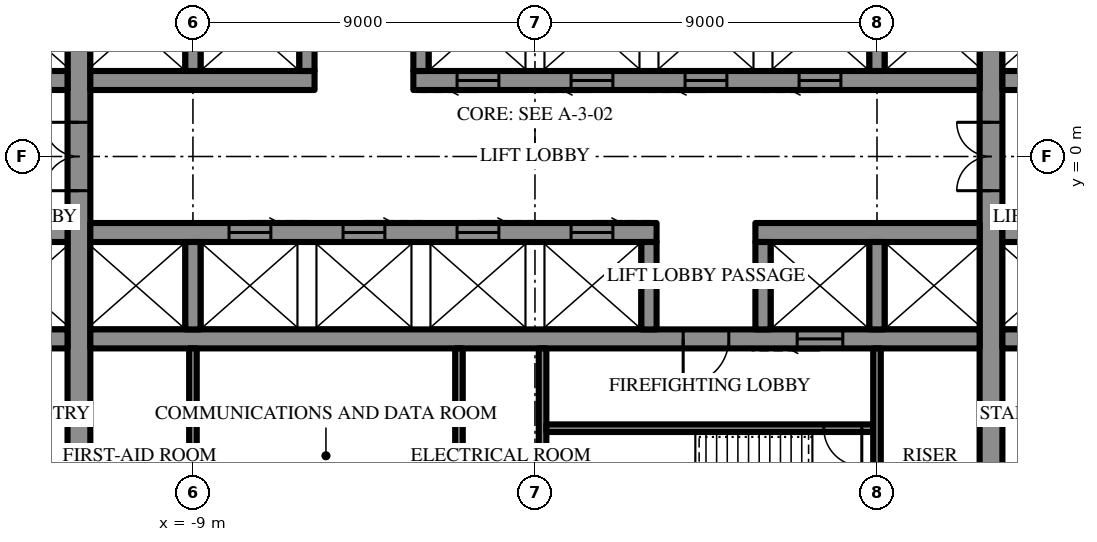
"""IFC4 building model, lengths in metres.
Left out: names, types, materials, properties, quantities, classifications, styles, units other than length and angle.
Written with IfcOpenShell. Run it as: python <this file> out.ifc"""

import sys

from ifc_helpers import new_model, si_unit, direction, frame, frame_2d, origin, place, context, subcontext, project, spatial, rectangle, extrude, element, fill, save


model = new_model("IFC4")
c1 = context("Model", 3, precision=1e-05, world=origin(), true_north=direction((0.0, 1.0)))
c2 = subcontext(c1, "Body", "Model", "MODEL_VIEW")
j1 = project(units=[si_unit("LENGTHUNIT", "METRE"), si_unit("PLANEANGLEUNIT", "RADIAN")], contexts=[c1])
p1 = place(None, origin())
s1 = spatial("IfcSite", under=j1, at=p1, CompositionType="ELEMENT")
p2 = place(p1, origin())
s2 = spatial("IfcBuilding", under=s1, at=p2, CompositionType="ELEMENT")
p3 = place(p2, frame((0.0, 0.0, 174.1)))
s3 = spatial("IfcBuildingStorey", under=s2, at=p3, CompositionType="ELEMENT", Elevation=174.1)
p4 = place(p3, frame((12.0, -10.7, 0.0), z_axis=(0.0, 0.0, 1.0), x_axis=(0.0, 1.0, 0.0)))
e1 = element("IfcWall", 1, at=p4, inside=s3, PredefinedType="SHEAR", context=c2, shape_type="SweptSolid", body=[
    extrude(rectangle(XDim=21.4, YDim=0.6, at=frame_2d((10.7, 0.0))), origin(), (0.0, 0.0, 1.0), 4.2),
])
p5 = place(p4, frame((9.8, 0.0, 0.0)))
e2 = element("IfcOpeningElement", 2, at=p5, cuts=e1, PredefinedType="OPENING", context=c2, shape_type="SweptSolid", body=[
    extrude(rectangle(XDim=1.8, YDim=2.4, at=frame_2d((0.9, 1.2))), frame((0.0, 0.31, 0.0), z_axis=(0.0, -1.0, 0.0), x_axis=(1.0, 0.0, 0.0)), (0.0, 0.0, 1.0), 0.62),
])
p6 = place(p3, frame((-12.0, -10.7, 0.0), z_axis=(0.0, 0.0, 1.0), x_axis=(0.0, 1.0, 0.0)))
e3 = element("IfcWall", 3, at=p6, inside=s3, PredefinedType="SHEAR", context=c2, shape_type="SweptSolid", body=[
    extrude(rectangle(XDim=21.4, YDim=0.6, at=frame_2d((10.7, 0.0))), origin(), (0.0, 0.0, 1.0), 4.2),
])
p7 = place(p6, frame((9.8, 0.0, 0.0)))
e4 = element("IfcOpeningElement", 4, at=p7, cuts=e3, PredefinedType="OPENING", context=c2, shape_type="SweptSolid", body=[
    extrude(rectangle(XDim=1.8, YDim=2.4, at=frame_2d((0.9, 1.2))), frame((0.0, 0.31, 0.0), z_axis=(0.0, -1.0, 0.0), x_axis=(1.0, 0.0, 0.0)), (0.0, 0.0, 1.0), 0.62),
])
p8 = place(p3, frame((-14.7, 2.0, 0.0), z_axis=(0.0, 0.0, 1.0), x_axis=(1.0, 0.0, 0.0)))
e5 = element("IfcWall", 5, at=p8, inside=s3, PredefinedType="SHEAR", context=c2, shape_type="SweptSolid", body=[
    extrude(rectangle(XDim=2.4, YDim=0.5, at=frame_2d((1.2, 0.0))), origin(), (0.0, 0.0, 1.0), 4.2),
])
p9 = place(p3, frame((-11.7, 2.0, 0.0), z_axis=(0.0, 0.0, 1.0), x_axis=(1.0, 0.0, 0.0)))
e6 = element("IfcWall", 6, at=p9, inside=s3, PredefinedType="SHEAR", context=c2, shape_type="SweptSolid", body=[
    extrude(rectangle(XDim=5.9, YDim=0.5, at=frame_2d((2.95, 0.0))), origin(), (0.0, 0.0, 1.0), 4.2),
])
p10 = place(p3, frame((-3.2, 2.0, 0.0), z_axis=(0.0, 0.0, 1.0), x_axis=(1.0, 0.0, 0.0)))
e7 = element("IfcWall", 7, at=p10, inside=s3, PredefinedType="SHEAR", context=c2, shape_type="SweptSolid", body=[
    extrude(rectangle(XDim=14.9, YDim=0.5, at=frame_2d((7.45, 0.0))), origin(), (0.0, 0.0, 1.0), 4.2),
])
p11 = place(p10, frame((1.15, 0.0, 0.0)))
e8 = element("IfcOpeningElement", 8, at=p11, cuts=e7, PredefinedType="OPENING", context=c2, shape_type="SweptSolid", body=[
    extrude(rectangle(XDim=1.1, YDim=2.2, at=frame_2d((0.55, 1.1))), frame((0.0, 0.26, 0.0), z_axis=(0.0, -1.0, 0.0), x_axis=(1.0, 0.0, 0.0)), (0.0, 0.0, 1.0), 0.52),
])
p12 = place(p10, frame((4.15, 0.0, 0.0)))
e9 = element("IfcOpeningElement", 9, at=p12, cuts=e7, PredefinedType="OPENING", context=c2, shape_type="SweptSolid", body=[
    extrude(rectangle(XDim=1.1, YDim=2.2, at=frame_2d((0.55, 1.1))), frame((0.0, 0.26, 0.0), z_axis=(0.0, -1.0, 0.0), x_axis=(1.0, 0.0, 0.0)), (0.0, 0.0, 1.0), 0.52),
])
p13 = place(p10, frame((7.15, 0.0, 0.0)))
e10 = element("IfcOpeningElement", 10, at=p13, cuts=e7, PredefinedType="OPENING", context=c2, shape_type="SweptSolid", body=[
    extrude(rectangle(XDim=1.1, YDim=2.2, at=frame_2d((0.55, 1.1))), frame((0.0, 0.26, 0.0), z_axis=(0.0, -1.0, 0.0), x_axis=(1.0, 0.0, 0.0)), (0.0, 0.0, 1.0), 0.52),
])
p14 = place(p10, frame((10.15, 0.0, 0.0)))
e11 = element("IfcOpeningElement", 11, at=p14, cuts=e7, PredefinedType="OPENING", context=c2, shape_type="SweptSolid", body=[
    extrude(rectangle(XDim=1.1, YDim=2.2, at=frame_2d((0.55, 1.1))), frame((0.0, 0.26, 0.0), z_axis=(0.0, -1.0, 0.0), x_axis=(1.0, 0.0, 0.0)), (0.0, 0.0, 1.0), 0.52),
])
p15 = place(p3, frame((12.3, 2.0, 0.0), z_axis=(0.0, 0.0, 1.0), x_axis=(1.0, 0.0, 0.0)))
e12 = element("IfcWall", 12, at=p15, inside=s3, PredefinedType="SHEAR", context=c2, shape_type="SweptSolid", body=[
    extrude(rectangle(XDim=2.4, YDim=0.5, at=frame_2d((1.2, 0.0))), origin(), (0.0, 0.0, 1.0), 4.2),
])
for number, where, z_axis, x_axis in (
    (13, (-9.0, 2.25, 0.0), (0.0, 0.0, 1.0), (0.0, 1.0, 0.0)),
    (14, (-6.0, 2.25, 0.0), (0.0, 0.0, 1.0), (0.0, 1.0, 0.0)),
    (15, (-3.0, 2.25, 0.0), (0.0, 0.0, 1.0), (0.0, 1.0, 0.0)),
    (16, (9.0, 2.25, 0.0), (0.0, 0.0, 1.0), (0.0, 1.0, 0.0)),
):
    element("IfcWall", number, at=place(p3, frame(where, z_axis=z_axis, x_axis=x_axis)), inside=s3, PredefinedType="SHEAR", context=c2, shape_type="SweptSolid", body=[
        extrude(rectangle(XDim=2.3, YDim=0.4, at=frame_2d((1.15, 0.0))), origin(), (0.0, 0.0, 1.0), 4.2),
    ])
p16 = place(p3, frame((14.7, -2.0, 0.0), z_axis=(0.0, 0.0, 1.0), x_axis=(-1.0, 0.0, 0.0)))
e17 = element("IfcWall", 17, at=p16, inside=s3, PredefinedType="SHEAR", context=c2, shape_type="SweptSolid", body=[
    extrude(rectangle(XDim=2.4, YDim=0.5, at=frame_2d((1.2, 0.0))), origin(), (0.0, 0.0, 1.0), 4.2),
])
p17 = place(p3, frame((11.7, -2.0, 0.0), z_axis=(0.0, 0.0, 1.0), x_axis=(-1.0, 0.0, 0.0)))
e18 = element("IfcWall", 18, at=p17, inside=s3, PredefinedType="SHEAR", context=c2, shape_type="SweptSolid", body=[
    extrude(rectangle(XDim=5.9, YDim=0.5, at=frame_2d((2.95, 0.0))), origin(), (0.0, 0.0, 1.0), 4.2),
])
p18 = place(p3, frame((3.2, -2.0, 0.0), z_axis=(0.0, 0.0, 1.0), x_axis=(-1.0, 0.0, 0.0)))
e19 = element("IfcWall", 19, at=p18, inside=s3, PredefinedType="SHEAR", context=c2, shape_type="SweptSolid", body=[
    extrude(rectangle(XDim=14.9, YDim=0.5, at=frame_2d((7.45, 0.0))), origin(), (0.0, 0.0, 1.0), 4.2),
])
p19 = place(p18, frame((1.15, 0.0, 0.0)))
e20 = element("IfcOpeningElement", 20, at=p19, cuts=e19, PredefinedType="OPENING", context=c2, shape_type="SweptSolid", body=[
    extrude(rectangle(XDim=1.1, YDim=2.2, at=frame_2d((0.55, 1.1))), frame((0.0, 0.26, 0.0), z_axis=(0.0, -1.0, 0.0), x_axis=(1.0, 0.0, 0.0)), (0.0, 0.0, 1.0), 0.52),
])
p20 = place(p18, frame((4.15, 0.0, 0.0)))
e21 = element("IfcOpeningElement", 21, at=p20, cuts=e19, PredefinedType="OPENING", context=c2, shape_type="SweptSolid", body=[
    extrude(rectangle(XDim=1.1, YDim=2.2, at=frame_2d((0.55, 1.1))), frame((0.0, 0.26, 0.0), z_axis=(0.0, -1.0, 0.0), x_axis=(1.0, 0.0, 0.0)), (0.0, 0.0, 1.0), 0.52),
])
p21 = place(p18, frame((7.15, 0.0, 0.0)))
e22 = element("IfcOpeningElement", 22, at=p21, cuts=e19, PredefinedType="OPENING", context=c2, shape_type="SweptSolid", body=[
    extrude(rectangle(XDim=1.1, YDim=2.2, at=frame_2d((0.55, 1.1))), frame((0.0, 0.26, 0.0), z_axis=(0.0, -1.0, 0.0), x_axis=(1.0, 0.0, 0.0)), (0.0, 0.0, 1.0), 0.52),
])
p22 = place(p18, frame((10.15, 0.0, 0.0)))
e23 = element("IfcOpeningElement", 23, at=p22, cuts=e19, PredefinedType="OPENING", context=c2, shape_type="SweptSolid", body=[
    extrude(rectangle(XDim=1.1, YDim=2.2, at=frame_2d((0.55, 1.1))), frame((0.0, 0.26, 0.0), z_axis=(0.0, -1.0, 0.0), x_axis=(1.0, 0.0, 0.0)), (0.0, 0.0, 1.0), 0.52),
])
for number, where, z_axis, x_axis in (
    (24, (-12.3, -2.0, 0.0), (0.0, 0.0, 1.0), (-1.0, 0.0, 0.0)),
    (25, (14.7, -4.8, 0.0), (0.0, 0.0, 1.0), (-1.0, 0.0, 0.0)),
):
    element("IfcWall", number, at=place(p3, frame(where, z_axis=z_axis, x_axis=x_axis)), inside=s3, PredefinedType="SHEAR", context=c2, shape_type="SweptSolid", body=[
        extrude(rectangle(XDim=2.4, YDim=0.5, at=frame_2d((1.2, 0.0))), origin(), (0.0, 0.0, 1.0), 4.2),
    ])
p23 = place(p3, frame((11.7, -4.8, 0.0), z_axis=(0.0, 0.0, 1.0), x_axis=(-1.0, 0.0, 0.0)))
e26 = element("IfcWall", 26, at=p23, inside=s3, PredefinedType="SHEAR", context=c2, shape_type="SweptSolid", body=[
    extrude(rectangle(XDim=23.4, YDim=0.5, at=frame_2d((11.7, 0.0))), origin(), (0.0, 0.0, 1.0), 4.2),
])
p24 = place(p23, frame((6.6, 0.0, 0.0)))
e27 = element("IfcOpeningElement", 27, at=p24, cuts=e26, PredefinedType="OPENING", context=c2, shape_type="SweptSolid", body=[
    extrude(rectangle(XDim=1.2, YDim=2.2, at=frame_2d((0.6, 1.1))), frame((0.0, 0.26, 0.0), z_axis=(0.0, -1.0, 0.0), x_axis=(1.0, 0.0, 0.0)), (0.0, 0.0, 1.0), 0.52),
])
p25 = place(p23, frame((3.6, 0.0, 0.0)))
e28 = element("IfcOpeningElement", 28, at=p25, cuts=e26, PredefinedType="OPENING", context=c2, shape_type="SweptSolid", body=[
    extrude(rectangle(XDim=1.2, YDim=2.2, at=frame_2d((0.6, 1.1))), frame((0.0, 0.26, 0.0), z_axis=(0.0, -1.0, 0.0), x_axis=(1.0, 0.0, 0.0)), (0.0, 0.0, 1.0), 0.52),
])
p26 = place(p3, frame((-12.3, -4.8, 0.0), z_axis=(0.0, 0.0, 1.0), x_axis=(-1.0, 0.0, 0.0)))
e29 = element("IfcWall", 29, at=p26, inside=s3, PredefinedType="SHEAR", context=c2, shape_type="SweptSolid", body=[
    extrude(rectangle(XDim=2.4, YDim=0.5, at=frame_2d((1.2, 0.0))), origin(), (0.0, 0.0, 1.0), 4.2),
])
for number, where, z_axis, x_axis in (
    (30, (9.0, -2.25, 0.0), (0.0, 0.0, 1.0), (0.0, -1.0, 0.0)),
    (31, (6.0, -2.25, 0.0), (0.0, 0.0, 1.0), (0.0, -1.0, 0.0)),
    (32, (3.0, -2.25, 0.0), (0.0, 0.0, 1.0), (0.0, -1.0, 0.0)),
    (33, (-9.0, -2.25, 0.0), (0.0, 0.0, 1.0), (0.0, -1.0, 0.0)),
):
    element("IfcWall", number, at=place(p3, frame(where, z_axis=z_axis, x_axis=x_axis)), inside=s3, PredefinedType="SHEAR", context=c2, shape_type="SweptSolid", body=[
        extrude(rectangle(XDim=2.3, YDim=0.4, at=frame_2d((1.15, 0.0))), origin(), (0.0, 0.0, 1.0), 4.2),
    ])
p27 = place(p3, frame((0.2, -5.05, 0.0), z_axis=(0.0, 0.0, 1.0), x_axis=(0.0, -1.0, 0.0)))
e34 = element("IfcWall", 34, at=p27, inside=s3, PredefinedType="SHEAR", context=c2, shape_type="SweptSolid", body=[
    extrude(rectangle(XDim=5.65, YDim=0.2, at=frame_2d((2.825, 0.0))), origin(), (0.0, 0.0, 1.0), 4.2),
])
p28 = place(p3, frame((8.9, -7.15, 0.0), z_axis=(0.0, 0.0, 1.0), x_axis=(-1.0, 0.0, 0.0)))
e35 = element("IfcWall", 35, at=p28, inside=s3, PredefinedType="SHEAR", context=c2, shape_type="SweptSolid", body=[
    extrude(rectangle(XDim=8.6, YDim=0.2, at=frame_2d((4.3, 0.0))), origin(), (0.0, 0.0, 1.0), 4.2),
])
p29 = place(p28, frame((0.3, 0.0, 0.0)))
e36 = element("IfcOpeningElement", 36, at=p29, cuts=e35, PredefinedType="OPENING", context=c2, shape_type="SweptSolid", body=[
    extrude(rectangle(XDim=1.0, YDim=2.2, at=frame_2d((0.5, 1.1))), frame((0.0, 0.11, 0.0), z_axis=(0.0, -1.0, 0.0), x_axis=(1.0, 0.0, 0.0)), (0.0, 0.0, 1.0), 0.22),
])
for number, where, z_axis, x_axis in (
    (37, (9.0, -5.05, 0.0), (0.0, 0.0, 1.0), (0.0, -1.0, 0.0)),
    (38, (-9.0, -5.05, 0.0), (0.0, 0.0, 1.0), (0.0, -1.0, 0.0)),
    (39, (-2.0, -5.05, 0.0), (0.0, 0.0, 1.0), (0.0, -1.0, 0.0)),
):
    element("IfcWall", number, at=place(p3, frame(where, z_axis=z_axis, x_axis=x_axis)), inside=s3, PredefinedType="PARTITIONING", context=c2, shape_type="SweptSolid", body=[
        extrude(rectangle(XDim=5.65, YDim=0.2, at=frame_2d((2.825, 0.0))), origin(), (0.0, 0.0, 1.0), 4.0),
    ])
p30 = place(p24, origin())
e40 = element("IfcDoor", 40, at=p30, inside=s3, OperationType="SINGLE_SWING_LEFT", PredefinedType="DOOR", context=c2, shape_type="SweptSolid", body=[
    extrude(rectangle(XDim=1.2, YDim=2.2, at=frame_2d((0.6, 1.1))), frame((0.0, 0.025, 0.0), z_axis=(0.0, -1.0, 0.0), x_axis=(1.0, 0.0, 0.0)), (0.0, 0.0, 1.0), 0.05),
])
fill(e27, e40)
p31 = place(p29, origin())
e41 = element("IfcDoor", 41, at=p31, inside=s3, OperationType="SINGLE_SWING_RIGHT", PredefinedType="DOOR", context=c2, shape_type="SweptSolid", body=[
    extrude(rectangle(XDim=1.0, YDim=2.2, at=frame_2d((0.5, 1.1))), frame((0.0, 0.025, 0.0), z_axis=(0.0, -1.0, 0.0), x_axis=(1.0, 0.0, 0.0)), (0.0, 0.0, 1.0), 0.05),
])
fill(e36, e41)
p32 = place(p5, origin())
e42 = element("IfcDoor", 42, at=p32, inside=s3, OperationType="DOUBLE_DOOR_SINGLE_SWING", PredefinedType="DOOR", context=c2, shape_type="SweptSolid", body=[
    extrude(rectangle(XDim=1.8, YDim=2.4, at=frame_2d((0.9, 1.2))), frame((0.0, 0.025, 0.0), z_axis=(0.0, -1.0, 0.0), x_axis=(1.0, 0.0, 0.0)), (0.0, 0.0, 1.0), 0.05),
])
fill(e2, e42)
p33 = place(p7, origin())
e43 = element("IfcDoor", 43, at=p33, inside=s3, OperationType="DOUBLE_DOOR_SINGLE_SWING", PredefinedType="DOOR", context=c2, shape_type="SweptSolid", body=[
    extrude(rectangle(XDim=1.8, YDim=2.4, at=frame_2d((0.9, 1.2))), frame((0.0, 0.025, 0.0), z_axis=(0.0, -1.0, 0.0), x_axis=(1.0, 0.0, 0.0)), (0.0, 0.0, 1.0), 0.05),
])
fill(e4, e43)
p34 = place(p11, frame((1.1, 0.0, 0.0), z_axis=(0.0, 0.0, 1.0), x_axis=(-1.0, 0.0, 0.0)))
e44 = element("IfcDoor", 44, at=p34, inside=s3, OperationType="SLIDING_TO_LEFT", PredefinedType="DOOR", context=c2, shape_type="SweptSolid", body=[
    extrude(rectangle(XDim=1.1, YDim=2.2, at=frame_2d((0.55, 1.1))), frame((0.0, 0.025, 0.0), z_axis=(0.0, -1.0, 0.0), x_axis=(1.0, 0.0, 0.0)), (0.0, 0.0, 1.0), 0.05),
])
fill(e8, e44)
p35 = place(p12, frame((1.1, 0.0, 0.0), z_axis=(0.0, 0.0, 1.0), x_axis=(-1.0, 0.0, 0.0)))
e45 = element("IfcDoor", 45, at=p35, inside=s3, OperationType="SLIDING_TO_LEFT", PredefinedType="DOOR", context=c2, shape_type="SweptSolid", body=[
    extrude(rectangle(XDim=1.1, YDim=2.2, at=frame_2d((0.55, 1.1))), frame((0.0, 0.025, 0.0), z_axis=(0.0, -1.0, 0.0), x_axis=(1.0, 0.0, 0.0)), (0.0, 0.0, 1.0), 0.05),
])
fill(e9, e45)
p36 = place(p13, frame((1.1, 0.0, 0.0), z_axis=(0.0, 0.0, 1.0), x_axis=(-1.0, 0.0, 0.0)))
e46 = element("IfcDoor", 46, at=p36, inside=s3, OperationType="SLIDING_TO_LEFT", PredefinedType="DOOR", context=c2, shape_type="SweptSolid", body=[
    extrude(rectangle(XDim=1.1, YDim=2.2, at=frame_2d((0.55, 1.1))), frame((0.0, 0.025, 0.0), z_axis=(0.0, -1.0, 0.0), x_axis=(1.0, 0.0, 0.0)), (0.0, 0.0, 1.0), 0.05),
])
fill(e10, e46)
p37 = place(p14, frame((1.1, 0.0, 0.0), z_axis=(0.0, 0.0, 1.0), x_axis=(-1.0, 0.0, 0.0)))
e47 = element("IfcDoor", 47, at=p37, inside=s3, OperationType="SLIDING_TO_LEFT", PredefinedType="DOOR", context=c2, shape_type="SweptSolid", body=[
    extrude(rectangle(XDim=1.1, YDim=2.2, at=frame_2d((0.55, 1.1))), frame((0.0, 0.025, 0.0), z_axis=(0.0, -1.0, 0.0), x_axis=(1.0, 0.0, 0.0)), (0.0, 0.0, 1.0), 0.05),
])
fill(e11, e47)
p38 = place(p25, origin())
e48 = element("IfcDoor", 48, at=p38, inside=s3, OperationType="SLIDING_TO_LEFT", PredefinedType="DOOR", context=c2, shape_type="SweptSolid", body=[
    extrude(rectangle(XDim=1.2, YDim=2.2, at=frame_2d((0.6, 1.1))), frame((0.0, 0.025, 0.0), z_axis=(0.0, -1.0, 0.0), x_axis=(1.0, 0.0, 0.0)), (0.0, 0.0, 1.0), 0.05),
])
fill(e28, e48)
p39 = place(p19, frame((1.1, 0.0, 0.0), z_axis=(0.0, 0.0, 1.0), x_axis=(-1.0, 0.0, 0.0)))
e49 = element("IfcDoor", 49, at=p39, inside=s3, OperationType="SLIDING_TO_LEFT", PredefinedType="DOOR", context=c2, shape_type="SweptSolid", body=[
    extrude(rectangle(XDim=1.1, YDim=2.2, at=frame_2d((0.55, 1.1))), frame((0.0, 0.025, 0.0), z_axis=(0.0, -1.0, 0.0), x_axis=(1.0, 0.0, 0.0)), (0.0, 0.0, 1.0), 0.05),
])
fill(e20, e49)
p40 = place(p20, frame((1.1, 0.0, 0.0), z_axis=(0.0, 0.0, 1.0), x_axis=(-1.0, 0.0, 0.0)))
e50 = element("IfcDoor", 50, at=p40, inside=s3, OperationType="SLIDING_TO_LEFT", PredefinedType="DOOR", context=c2, shape_type="SweptSolid", body=[
    extrude(rectangle(XDim=1.1, YDim=2.2, at=frame_2d((0.55, 1.1))), frame((0.0, 0.025, 0.0), z_axis=(0.0, -1.0, 0.0), x_axis=(1.0, 0.0, 0.0)), (0.0, 0.0, 1.0), 0.05),
])
fill(e21, e50)
p41 = place(p21, frame((1.1, 0.0, 0.0), z_axis=(0.0, 0.0, 1.0), x_axis=(-1.0, 0.0, 0.0)))
e51 = element("IfcDoor", 51, at=p41, inside=s3, OperationType="SLIDING_TO_LEFT", PredefinedType="DOOR", context=c2, shape_type="SweptSolid", body=[
    extrude(rectangle(XDim=1.1, YDim=2.2, at=frame_2d((0.55, 1.1))), frame((0.0, 0.025, 0.0), z_axis=(0.0, -1.0, 0.0), x_axis=(1.0, 0.0, 0.0)), (0.0, 0.0, 1.0), 0.05),
])
fill(e22, e51)
p42 = place(p22, frame((1.1, 0.0, 0.0), z_axis=(0.0, 0.0, 1.0), x_axis=(-1.0, 0.0, 0.0)))
e52 = element("IfcDoor", 52, at=p42, inside=s3, OperationType="SLIDING_TO_LEFT", PredefinedType="DOOR", context=c2, shape_type="SweptSolid", body=[
    extrude(rectangle(XDim=1.1, YDim=2.2, at=frame_2d((0.55, 1.1))), frame((0.0, 0.025, 0.0), z_axis=(0.0, -1.0, 0.0), x_axis=(1.0, 0.0, 0.0)), (0.0, 0.0, 1.0), 0.05),
])
fill(e23, e52)
save(model, sys.argv[1])
